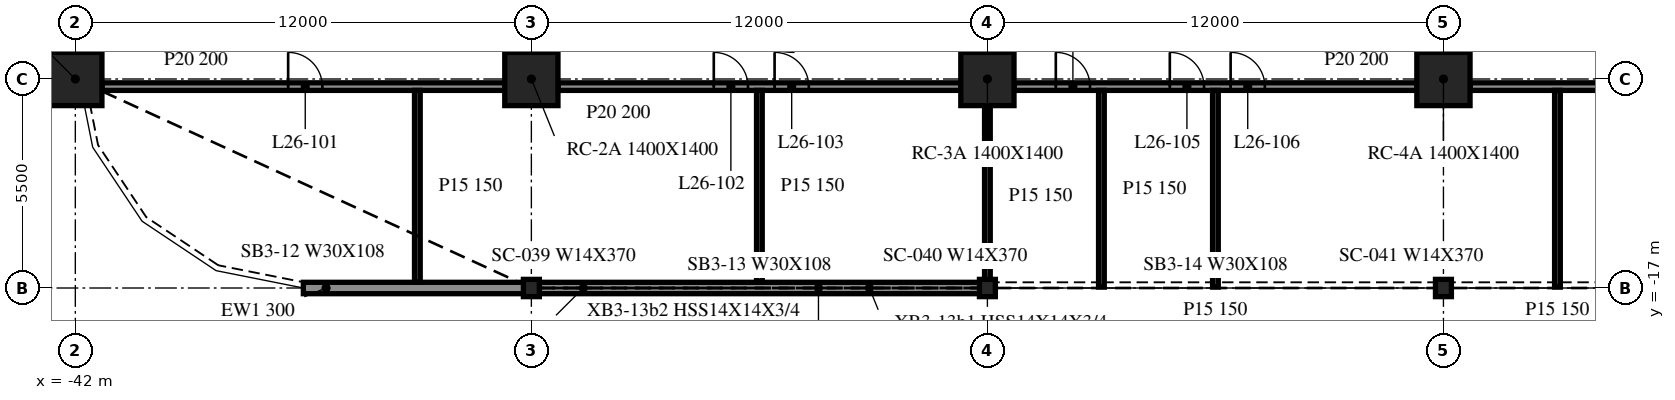
"""IFC4 building model, lengths in metres.
Left out: names, types, materials, properties, quantities, classifications, styles, units other than length and angle.
Written with IfcOpenShell. Run it as: python <this file> out.ifc"""

import sys

from ifc_helpers import new_model, si_unit, direction, frame, frame_2d, origin, origin_2d, place, context, subcontext, project, spatial, rectangle, i_section, extrude, element, fill, save


model = new_model("IFC4")
c1 = context("Model", 3, precision=1e-05, world=origin(), true_north=direction((0.0, 1.0)))
c2 = subcontext(c1, "Body", "Model", "MODEL_VIEW")
j1 = project(units=[si_unit("LENGTHUNIT", "METRE"), si_unit("PLANEANGLEUNIT", "RADIAN")], contexts=[c1])
p1 = place(None, origin())
s1 = spatial("IfcSite", under=j1, at=p1, CompositionType="ELEMENT")
p2 = place(p1, origin())
s2 = spatial("IfcBuilding", under=s1, at=p2, CompositionType="ELEMENT")
p3 = place(p2, frame((0.0, 0.0, 113.5)))
s3 = spatial("IfcBuildingStorey", under=s2, at=p3, CompositionType="ELEMENT", Elevation=113.5)
for number, where, z_axis, x_axis in (
    (1, (-42.0, -11.5, -0.34), (0.0, 0.0, 1.0), (1.0, 0.0, 0.0)),
    (2, (-30.0, -11.5, -0.34), (0.0, 0.0, 1.0), (1.0, 0.0, 0.0)),
    (3, (-18.0, -11.5, -0.34), (0.0, 0.0, 1.0), (1.0, 0.0, 0.0)),
    (4, (-6.0, -11.5, -0.34), (0.0, 0.0, 1.0), (1.0, 0.0, 0.0)),
):
    element("IfcColumn", number, at=place(p3, frame(where, z_axis=z_axis, x_axis=x_axis)), inside=s3, PredefinedType="COLUMN", context=c2, shape_type="SweptSolid", body=[
        extrude(rectangle(XDim=1.4, YDim=1.4, at=origin_2d()), origin(), (0.0, 0.0, 1.0), 3.89),
    ])
for number, where, z_axis, x_axis in (
    (5, (-30.0, -17.0, -0.34), (0.0, 0.0, 1.0), (1.0, 0.0, 0.0)),
    (6, (-18.0, -17.0, -0.34), (0.0, 0.0, 1.0), (1.0, 0.0, 0.0)),
    (7, (-6.0, -17.0, -0.34), (0.0, 0.0, 1.0), (1.0, 0.0, 0.0)),
):
    element("IfcColumn", number, at=place(p3, frame(where, z_axis=z_axis, x_axis=x_axis)), inside=s3, PredefinedType="COLUMN", context=c2, shape_type="SweptSolid", body=[
        extrude(i_section(OverallWidth=0.419, OverallDepth=0.455, WebThickness=0.042, FlangeThickness=0.068, at=origin_2d()), origin(), (0.0, 0.0, 1.0), 3.89),
    ])
p4 = place(p3, frame((-36.0, -17.0, 0.0), z_axis=(0.0, 0.0, 1.0), x_axis=(1.0, 0.0, 0.0)))
e8 = element("IfcWall", 8, at=p4, inside=s3, PredefinedType="NOTDEFINED", context=c2, shape_type="SweptSolid", body=[
    extrude(rectangle(XDim=5.979, YDim=0.3, at=frame_2d((2.99, 0.0))), origin(), (0.0, 0.0, 1.0), 3.55),
])
p5 = place(p3, frame((-29.979, -17.0, 0.0), z_axis=(0.0, 0.0, 1.0), x_axis=(1.0, 0.0, 0.0)))
e9 = element("IfcWall", 9, at=p5, inside=s3, PredefinedType="NOTDEFINED", context=c2, shape_type="SweptSolid", body=[
    extrude(rectangle(XDim=11.958, YDim=0.3, at=frame_2d((5.979, 0.0))), origin(), (0.0, 0.0, 1.0), 3.55),
])
p6 = place(p3, frame((-41.3, -11.7, 0.0), z_axis=(0.0, 0.0, 1.0), x_axis=(1.0, 0.0, 0.0)))
e10 = element("IfcWall", 10, at=p6, inside=s3, PredefinedType="PARTITIONING", context=c2, shape_type="SweptSolid", body=[
    extrude(rectangle(XDim=10.6, YDim=0.2, at=frame_2d((5.3, 0.0))), origin(), (0.0, 0.0, 1.0), 2.551),
])
p7 = place(p6, frame((4.9, 0.0, 0.0)))
e11 = element("IfcOpeningElement", 11, at=p7, cuts=e10, PredefinedType="OPENING", context=c2, shape_type="SweptSolid", body=[
    extrude(rectangle(XDim=0.9, YDim=2.1, at=frame_2d((0.45, 1.05))), frame((0.0, 0.11, 0.0), z_axis=(0.0, -1.0, 0.0), x_axis=(1.0, 0.0, 0.0)), (0.0, 0.0, 1.0), 0.22),
])
p8 = place(p3, frame((-29.3, -11.7, 0.0), z_axis=(0.0, 0.0, 1.0), x_axis=(1.0, 0.0, 0.0)))
e12 = element("IfcWall", 12, at=p8, inside=s3, PredefinedType="PARTITIONING", context=c2, shape_type="SweptSolid", body=[
    extrude(rectangle(XDim=10.6, YDim=0.2, at=frame_2d((5.3, 0.0))), origin(), (0.0, 0.0, 1.0), 3.55),
])
p9 = place(p8, frame((4.1, 0.0, 0.0)))
e13 = element("IfcOpeningElement", 13, at=p9, cuts=e12, PredefinedType="OPENING", context=c2, shape_type="SweptSolid", body=[
    extrude(rectangle(XDim=0.9, YDim=2.1, at=frame_2d((0.45, 1.05))), frame((0.0, 0.11, 0.0), z_axis=(0.0, -1.0, 0.0), x_axis=(1.0, 0.0, 0.0)), (0.0, 0.0, 1.0), 0.22),
])
p10 = place(p8, frame((5.7, 0.0, 0.0)))
e14 = element("IfcOpeningElement", 14, at=p10, cuts=e12, PredefinedType="OPENING", context=c2, shape_type="SweptSolid", body=[
    extrude(rectangle(XDim=0.9, YDim=2.1, at=frame_2d((0.45, 1.05))), frame((0.0, 0.11, 0.0), z_axis=(0.0, -1.0, 0.0), x_axis=(1.0, 0.0, 0.0)), (0.0, 0.0, 1.0), 0.22),
])
p11 = place(p3, frame((-17.3, -11.7, 0.0), z_axis=(0.0, 0.0, 1.0), x_axis=(1.0, 0.0, 0.0)))
e15 = element("IfcWall", 15, at=p11, inside=s3, PredefinedType="PARTITIONING", context=c2, shape_type="SweptSolid", body=[
    extrude(rectangle(XDim=10.6, YDim=0.2, at=frame_2d((5.3, 0.0))), origin(), (0.0, 0.0, 1.0), 3.55),
])
p12 = place(p11, frame((1.1, 0.0, 0.0)))
e16 = element("IfcOpeningElement", 16, at=p12, cuts=e15, PredefinedType="OPENING", context=c2, shape_type="SweptSolid", body=[
    extrude(rectangle(XDim=0.9, YDim=2.1, at=frame_2d((0.45, 1.05))), frame((0.0, 0.11, 0.0), z_axis=(0.0, -1.0, 0.0), x_axis=(1.0, 0.0, 0.0)), (0.0, 0.0, 1.0), 0.22),
])
p13 = place(p11, frame((4.1, 0.0, 0.0)))
e17 = element("IfcOpeningElement", 17, at=p13, cuts=e15, PredefinedType="OPENING", context=c2, shape_type="SweptSolid", body=[
    extrude(rectangle(XDim=0.9, YDim=2.1, at=frame_2d((0.45, 1.05))), frame((0.0, 0.11, 0.0), z_axis=(0.0, -1.0, 0.0), x_axis=(1.0, 0.0, 0.0)), (0.0, 0.0, 1.0), 0.22),
])
p14 = place(p11, frame((5.7, 0.0, 0.0)))
e18 = element("IfcOpeningElement", 18, at=p14, cuts=e15, PredefinedType="OPENING", context=c2, shape_type="SweptSolid", body=[
    extrude(rectangle(XDim=0.9, YDim=2.1, at=frame_2d((0.45, 1.05))), frame((0.0, 0.11, 0.0), z_axis=(0.0, -1.0, 0.0), x_axis=(1.0, 0.0, 0.0)), (0.0, 0.0, 1.0), 0.22),
])
p15 = place(p3, frame((-5.3, -11.7, 0.0), z_axis=(0.0, 0.0, 1.0), x_axis=(1.0, 0.0, 0.0)))
e19 = element("IfcWall", 19, at=p15, inside=s3, PredefinedType="PARTITIONING", context=c2, shape_type="SweptSolid", body=[
    extrude(rectangle(XDim=10.6, YDim=0.2, at=frame_2d((5.3, 0.0))), origin(), (0.0, 0.0, 1.0), 3.55),
])
p16 = place(p15, frame((4.9, 0.0, 0.0)))
e20 = element("IfcOpeningElement", 20, at=p16, cuts=e19, PredefinedType="OPENING", context=c2, shape_type="SweptSolid", body=[
    extrude(rectangle(XDim=0.9, YDim=2.1, at=frame_2d((0.45, 1.05))), frame((0.0, 0.11, 0.0), z_axis=(0.0, -1.0, 0.0), x_axis=(1.0, 0.0, 0.0)), (0.0, 0.0, 1.0), 0.22),
])
for number, where, z_axis, x_axis in (
    (21, (-33.0, -16.85, 0.0), (0.0, 0.0, 1.0), (0.0, 1.0, 0.0)),
    (22, (-24.0, -16.85, 0.0), (0.0, 0.0, 1.0), (0.0, 1.0, 0.0)),
):
    element("IfcWall", number, at=place(p3, frame(where, z_axis=z_axis, x_axis=x_axis)), inside=s3, PredefinedType="PARTITIONING", context=c2, shape_type="SweptSolid", body=[
        extrude(rectangle(XDim=5.05, YDim=0.15, at=frame_2d((2.525, 0.0))), origin(), (0.0, 0.0, 1.0), 3.55),
    ])
p17 = place(p3, frame((-18.0, -16.975, 0.0), z_axis=(0.0, 0.0, 1.0), x_axis=(0.0, 1.0, 0.0)))
e23 = element("IfcWall", 23, at=p17, inside=s3, PredefinedType="PARTITIONING", context=c2, shape_type="SweptSolid", body=[
    extrude(rectangle(XDim=4.775, YDim=0.15, at=frame_2d((2.388, 0.0))), origin(), (0.0, 0.0, 1.0), 3.55),
])
for number, where, z_axis, x_axis in (
    (24, (-15.0, -16.975, 0.0), (0.0, 0.0, 1.0), (0.0, 1.0, 0.0)),
    (25, (-12.0, -16.975, 0.0), (0.0, 0.0, 1.0), (0.0, 1.0, 0.0)),
    (26, (-3.0, -16.975, 0.0), (0.0, 0.0, 1.0), (0.0, 1.0, 0.0)),
):
    element("IfcWall", number, at=place(p3, frame(where, z_axis=z_axis, x_axis=x_axis)), inside=s3, PredefinedType="PARTITIONING", context=c2, shape_type="SweptSolid", body=[
        extrude(rectangle(XDim=5.175, YDim=0.15, at=frame_2d((2.587, 0.0))), origin(), (0.0, 0.0, 1.0), 3.55),
    ])
p18 = place(p7, origin())
e27 = element("IfcDoor", 27, at=p18, inside=s3, OperationType="SINGLE_SWING_LEFT", PredefinedType="DOOR", context=c2, shape_type="SweptSolid", body=[
    extrude(rectangle(XDim=0.9, YDim=2.1, at=frame_2d((0.45, 1.05))), frame((0.0, 0.025, 0.0), z_axis=(0.0, -1.0, 0.0), x_axis=(1.0, 0.0, 0.0)), (0.0, 0.0, 1.0), 0.05),
])
fill(e11, e27)
p19 = place(p9, origin())
e28 = element("IfcDoor", 28, at=p19, inside=s3, OperationType="SINGLE_SWING_RIGHT", PredefinedType="DOOR", context=c2, shape_type="SweptSolid", body=[
    extrude(rectangle(XDim=0.9, YDim=2.1, at=frame_2d((0.45, 1.05))), frame((0.0, 0.025, 0.0), z_axis=(0.0, -1.0, 0.0), x_axis=(1.0, 0.0, 0.0)), (0.0, 0.0, 1.0), 0.05),
])
fill(e13, e28)
p20 = place(p10, origin())
e29 = element("IfcDoor", 29, at=p20, inside=s3, OperationType="SINGLE_SWING_LEFT", PredefinedType="DOOR", context=c2, shape_type="SweptSolid", body=[
    extrude(rectangle(XDim=0.9, YDim=2.1, at=frame_2d((0.45, 1.05))), frame((0.0, 0.025, 0.0), z_axis=(0.0, -1.0, 0.0), x_axis=(1.0, 0.0, 0.0)), (0.0, 0.0, 1.0), 0.05),
])
fill(e14, e29)
p21 = place(p12, origin())
e30 = element("IfcDoor", 30, at=p21, inside=s3, OperationType="SINGLE_SWING_RIGHT", PredefinedType="DOOR", context=c2, shape_type="SweptSolid", body=[
    extrude(rectangle(XDim=0.9, YDim=2.1, at=frame_2d((0.45, 1.05))), frame((0.0, 0.025, 0.0), z_axis=(0.0, -1.0, 0.0), x_axis=(1.0, 0.0, 0.0)), (0.0, 0.0, 1.0), 0.05),
])
fill(e16, e30)
p22 = place(p13, origin())
e31 = element("IfcDoor", 31, at=p22, inside=s3, OperationType="SINGLE_SWING_RIGHT", PredefinedType="DOOR", context=c2, shape_type="SweptSolid", body=[
    extrude(rectangle(XDim=0.9, YDim=2.1, at=frame_2d((0.45, 1.05))), frame((0.0, 0.025, 0.0), z_axis=(0.0, -1.0, 0.0), x_axis=(1.0, 0.0, 0.0)), (0.0, 0.0, 1.0), 0.05),
])
fill(e17, e31)
p23 = place(p14, origin())
e32 = element("IfcDoor", 32, at=p23, inside=s3, OperationType="SINGLE_SWING_LEFT", PredefinedType="DOOR", context=c2, shape_type="SweptSolid", body=[
    extrude(rectangle(XDim=0.9, YDim=2.1, at=frame_2d((0.45, 1.05))), frame((0.0, 0.025, 0.0), z_axis=(0.0, -1.0, 0.0), x_axis=(1.0, 0.0, 0.0)), (0.0, 0.0, 1.0), 0.05),
])
fill(e18, e32)
save(model, sys.argv[1])
